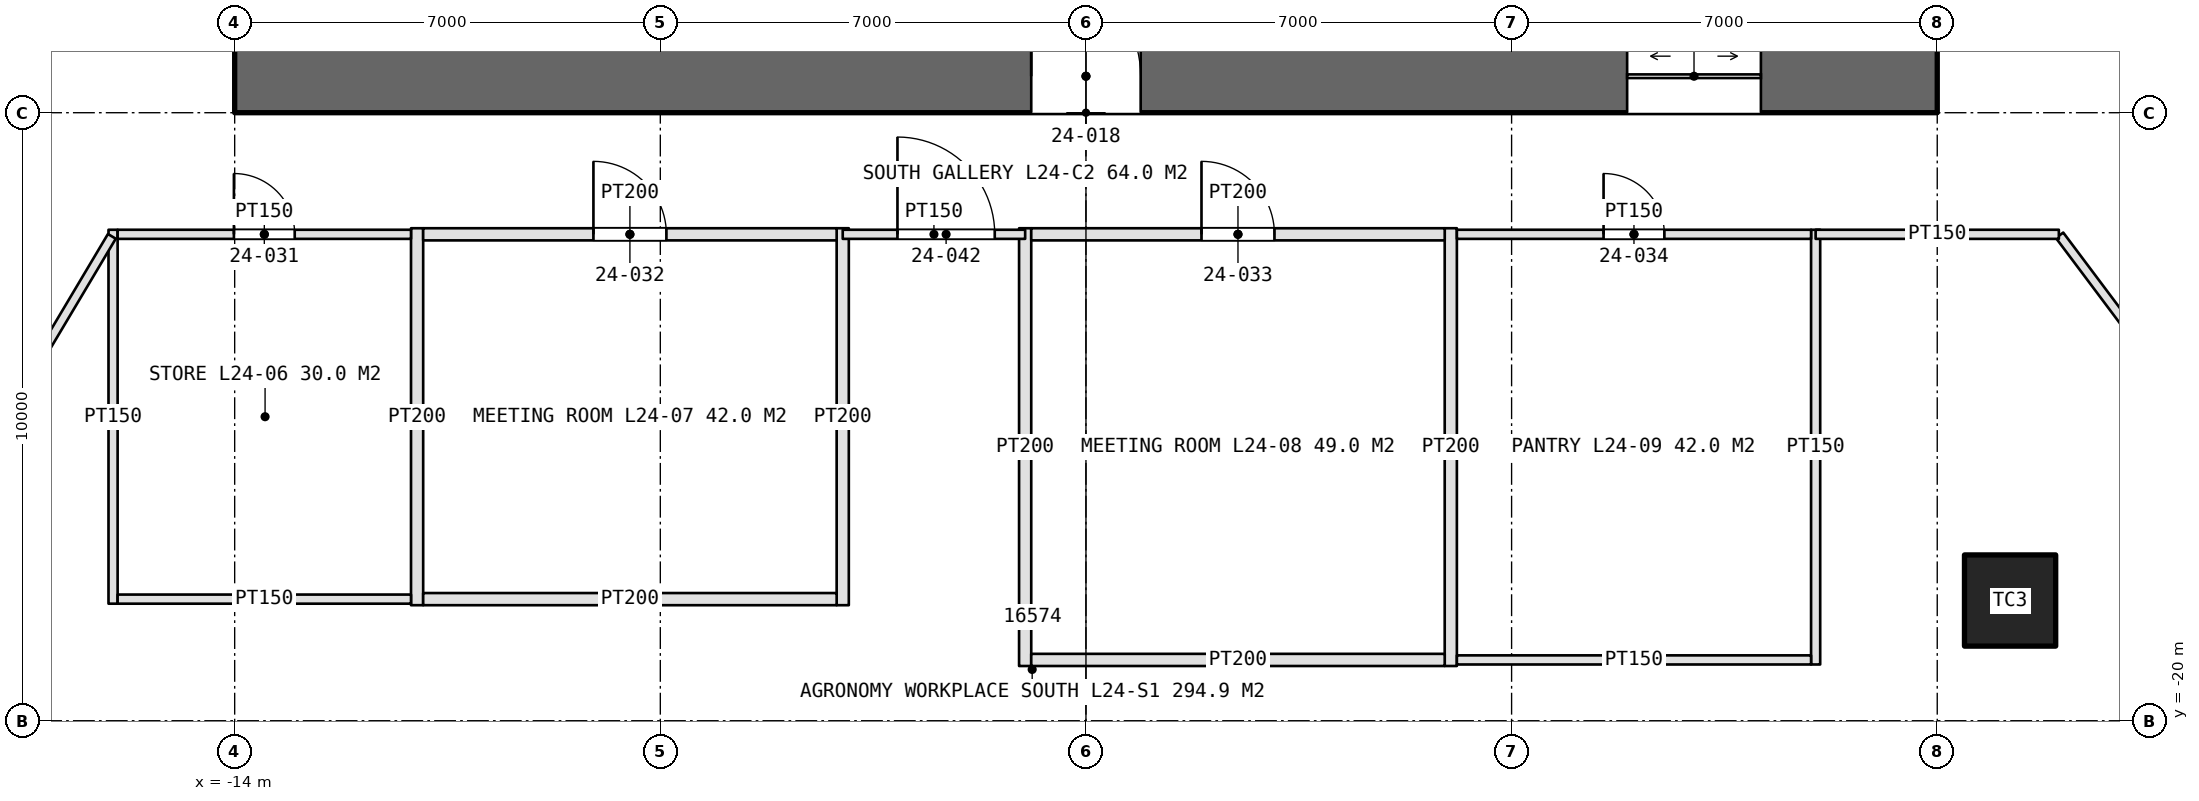
"""IFC4 building model, lengths in metres.
Left out: names, types, materials, properties, quantities, classifications, styles, units other than length and angle.
Written with IfcOpenShell. Run it as: python <this file> out.ifc"""

import sys

from ifc_helpers import new_model, si_unit, direction, frame, frame_2d, origin, origin_2d, place, context, subcontext, project, spatial, rectangle, extrude, element, fill, save


model = new_model("IFC4")
c1 = context("Model", 3, precision=1e-05, world=origin(), true_north=direction((0.0, 1.0)))
c2 = subcontext(c1, "Body", "Model", "MODEL_VIEW")
j1 = project(units=[si_unit("LENGTHUNIT", "METRE"), si_unit("PLANEANGLEUNIT", "RADIAN")], contexts=[c1])
p1 = place(None, origin())
s1 = spatial("IfcSite", under=j1, at=p1, CompositionType="ELEMENT")
p2 = place(p1, origin())
s2 = spatial("IfcBuilding", under=s1, at=p2, CompositionType="ELEMENT")
p3 = place(p2, frame((0.0, 0.0, 117.6)))
s3 = spatial("IfcBuildingStorey", under=s2, at=p3, CompositionType="ELEMENT", Elevation=117.6)
p4 = place(p3, frame((-14.0, -9.4, 0.0), z_axis=(0.0, 0.0, 1.0), x_axis=(1.0, 0.0, 0.0)))
e1 = element("IfcWall", 1, at=p4, inside=s3, PredefinedType="SHEAR", context=c2, shape_type="SweptSolid", body=[
    extrude(rectangle(XDim=28.0, YDim=1.2, at=frame_2d((14.0, 0.0))), origin(), (0.0, 0.0, 1.0), 4.2),
])
p5 = place(p4, frame((13.1, 0.0, 0.0)))
e2 = element("IfcOpeningElement", 2, at=p5, cuts=e1, PredefinedType="OPENING", context=c2, shape_type="SweptSolid", body=[
    extrude(rectangle(XDim=1.8, YDim=2.4, at=frame_2d((0.9, 1.2))), frame((0.0, 0.61, 0.0), z_axis=(0.0, -1.0, 0.0), x_axis=(1.0, 0.0, 0.0)), (0.0, 0.0, 1.0), 1.22),
])
p6 = place(p4, frame((22.9, 0.0, 0.0)))
e3 = element("IfcOpeningElement", 3, at=p6, cuts=e1, PredefinedType="OPENING", context=c2, shape_type="SweptSolid", body=[
    extrude(rectangle(XDim=2.2, YDim=2.7, at=frame_2d((1.1, 1.35))), frame((0.0, 0.61, 0.0), z_axis=(0.0, -1.0, 0.0), x_axis=(1.0, 0.0, 0.0)), (0.0, 0.0, 1.0), 1.22),
])
p7 = place(p3, frame((15.198, -18.023, 0.0), z_axis=(0.0, 0.0, 1.0), x_axis=(1.0, 0.0, 0.0)))
e4 = element("IfcColumn", 4, at=p7, inside=s3, PredefinedType="COLUMN", context=c2, shape_type="SweptSolid", body=[
    extrude(rectangle(XDim=1.5, YDim=1.5, at=origin_2d()), origin(), (0.0, 0.0, 1.0), 4.2),
])
p8 = place(p3, frame((-16.0, -11.925, 0.0), z_axis=(0.0, 0.0, 1.0), x_axis=(0.0, -1.0, 0.0)))
e5 = element("IfcWall", 5, at=p8, inside=s3, PredefinedType="PARTITIONING", context=c2, shape_type="SweptSolid", body=[
    extrude(rectangle(XDim=6.15, YDim=0.15, at=frame_2d((3.075, 0.0))), origin(), (0.0, 0.0, 1.0), 3.0),
])
for number, where, z_axis, x_axis in (
    (6, (-11.0, -11.9, 0.0), (0.0, 0.0, 1.0), (0.0, -1.0, 0.0)),
    (7, (-4.0, -11.9, 0.0), (0.0, 0.0, 1.0), (0.0, -1.0, 0.0)),
):
    element("IfcWall", number, at=place(p3, frame(where, z_axis=z_axis, x_axis=x_axis)), inside=s3, PredefinedType="PARTITIONING", context=c2, shape_type="SweptSolid", body=[
        extrude(rectangle(XDim=6.2, YDim=0.2, at=frame_2d((3.1, 0.0))), origin(), (0.0, 0.0, 1.0), 3.0),
    ])
p9 = place(p3, frame((-15.925, -12.0, 0.0), z_axis=(0.0, 0.0, 1.0), x_axis=(1.0, 0.0, 0.0)))
e8 = element("IfcWall", 8, at=p9, inside=s3, PredefinedType="PARTITIONING", context=c2, shape_type="SweptSolid", body=[
    extrude(rectangle(XDim=4.825, YDim=0.15, at=frame_2d((2.413, 0.0))), origin(), (0.0, 0.0, 1.0), 3.0),
])
p10 = place(p9, frame((1.913, 0.0, 0.0)))
e9 = element("IfcOpeningElement", 9, at=p10, cuts=e8, PredefinedType="OPENING", context=c2, shape_type="SweptSolid", body=[
    extrude(rectangle(XDim=1.0, YDim=2.2, at=frame_2d((0.5, 1.1))), frame((0.0, 0.085, 0.0), z_axis=(0.0, -1.0, 0.0), x_axis=(1.0, 0.0, 0.0)), (0.0, 0.0, 1.0), 0.17),
])
p11 = place(p3, frame((-15.925, -18.0, 0.0), z_axis=(0.0, 0.0, 1.0), x_axis=(1.0, 0.0, 0.0)))
e10 = element("IfcWall", 10, at=p11, inside=s3, PredefinedType="PARTITIONING", context=c2, shape_type="SweptSolid", body=[
    extrude(rectangle(XDim=4.825, YDim=0.15, at=frame_2d((2.413, 0.0))), origin(), (0.0, 0.0, 1.0), 3.0),
])
p12 = place(p3, frame((-10.9, -12.0, 0.0), z_axis=(0.0, 0.0, 1.0), x_axis=(1.0, 0.0, 0.0)))
e11 = element("IfcWall", 11, at=p12, inside=s3, PredefinedType="PARTITIONING", context=c2, shape_type="SweptSolid", body=[
    extrude(rectangle(XDim=6.8, YDim=0.2, at=frame_2d((3.4, 0.0))), origin(), (0.0, 0.0, 1.0), 3.0),
])
p13 = place(p12, frame((2.8, 0.0, 0.0)))
e12 = element("IfcOpeningElement", 12, at=p13, cuts=e11, PredefinedType="OPENING", context=c2, shape_type="SweptSolid", body=[
    extrude(rectangle(XDim=1.2, YDim=2.4, at=frame_2d((0.6, 1.2))), frame((0.0, 0.11, 0.0), z_axis=(0.0, -1.0, 0.0), x_axis=(1.0, 0.0, 0.0)), (0.0, 0.0, 1.0), 0.22),
])
p14 = place(p3, frame((-10.9, -18.0, 0.0), z_axis=(0.0, 0.0, 1.0), x_axis=(1.0, 0.0, 0.0)))
e13 = element("IfcWall", 13, at=p14, inside=s3, PredefinedType="PARTITIONING", context=c2, shape_type="SweptSolid", body=[
    extrude(rectangle(XDim=6.8, YDim=0.2, at=frame_2d((3.4, 0.0))), origin(), (0.0, 0.0, 1.0), 3.0),
])
for number, where, z_axis, x_axis in (
    (14, (-1.0, -11.9, 0.0), (0.0, 0.0, 1.0), (0.0, -1.0, 0.0)),
    (15, (6.0, -11.9, 0.0), (0.0, 0.0, 1.0), (0.0, -1.0, 0.0)),
):
    element("IfcWall", number, at=place(p3, frame(where, z_axis=z_axis, x_axis=x_axis)), inside=s3, PredefinedType="PARTITIONING", context=c2, shape_type="SweptSolid", body=[
        extrude(rectangle(XDim=7.2, YDim=0.2, at=frame_2d((3.6, 0.0))), origin(), (0.0, 0.0, 1.0), 3.0),
    ])
p15 = place(p3, frame((12.0, -11.925, 0.0), z_axis=(0.0, 0.0, 1.0), x_axis=(0.0, -1.0, 0.0)))
e16 = element("IfcWall", 16, at=p15, inside=s3, PredefinedType="PARTITIONING", context=c2, shape_type="SweptSolid", body=[
    extrude(rectangle(XDim=7.15, YDim=0.15, at=frame_2d((3.575, 0.0))), origin(), (0.0, 0.0, 1.0), 3.0),
])
p16 = place(p3, frame((-0.9, -12.0, 0.0), z_axis=(0.0, 0.0, 1.0), x_axis=(1.0, 0.0, 0.0)))
e17 = element("IfcWall", 17, at=p16, inside=s3, PredefinedType="PARTITIONING", context=c2, shape_type="SweptSolid", body=[
    extrude(rectangle(XDim=6.8, YDim=0.2, at=frame_2d((3.4, 0.0))), origin(), (0.0, 0.0, 1.0), 3.0),
])
p17 = place(p16, frame((2.8, 0.0, 0.0)))
e18 = element("IfcOpeningElement", 18, at=p17, cuts=e17, PredefinedType="OPENING", context=c2, shape_type="SweptSolid", body=[
    extrude(rectangle(XDim=1.2, YDim=2.4, at=frame_2d((0.6, 1.2))), frame((0.0, 0.11, 0.0), z_axis=(0.0, -1.0, 0.0), x_axis=(1.0, 0.0, 0.0)), (0.0, 0.0, 1.0), 0.22),
])
p18 = place(p3, frame((-0.9, -19.0, 0.0), z_axis=(0.0, 0.0, 1.0), x_axis=(1.0, 0.0, 0.0)))
e19 = element("IfcWall", 19, at=p18, inside=s3, PredefinedType="PARTITIONING", context=c2, shape_type="SweptSolid", body=[
    extrude(rectangle(XDim=6.8, YDim=0.2, at=frame_2d((3.4, 0.0))), origin(), (0.0, 0.0, 1.0), 3.0),
])
p19 = place(p3, frame((6.1, -12.0, 0.0), z_axis=(0.0, 0.0, 1.0), x_axis=(1.0, 0.0, 0.0)))
e20 = element("IfcWall", 20, at=p19, inside=s3, PredefinedType="PARTITIONING", context=c2, shape_type="SweptSolid", body=[
    extrude(rectangle(XDim=5.825, YDim=0.15, at=frame_2d((2.913, 0.0))), origin(), (0.0, 0.0, 1.0), 3.0),
])
p20 = place(p19, frame((2.413, 0.0, 0.0)))
e21 = element("IfcOpeningElement", 21, at=p20, cuts=e20, PredefinedType="OPENING", context=c2, shape_type="SweptSolid", body=[
    extrude(rectangle(XDim=1.0, YDim=2.2, at=frame_2d((0.5, 1.1))), frame((0.0, 0.085, 0.0), z_axis=(0.0, -1.0, 0.0), x_axis=(1.0, 0.0, 0.0)), (0.0, 0.0, 1.0), 0.17),
])
p21 = place(p3, frame((6.1, -19.0, 0.0), z_axis=(0.0, 0.0, 1.0), x_axis=(1.0, 0.0, 0.0)))
e22 = element("IfcWall", 22, at=p21, inside=s3, PredefinedType="PARTITIONING", context=c2, shape_type="SweptSolid", body=[
    extrude(rectangle(XDim=5.825, YDim=0.15, at=frame_2d((2.913, 0.0))), origin(), (0.0, 0.0, 1.0), 3.0),
])
p22 = place(p3, frame((-16.02, -12.034, 0.0), z_axis=(0.0, 0.0, 1.0), x_axis=(-0.511518902153, -0.859272024879, 0.0)))
e23 = element("IfcWall", 23, at=p22, inside=s3, PredefinedType="PARTITIONING", context=c2, shape_type="SweptSolid", body=[
    extrude(rectangle(XDim=8.451, YDim=0.15, at=frame_2d((4.226, 0.0))), origin(), (0.0, 0.0, 1.0), 3.0),
])
p23 = place(p3, frame((16.012, -12.016, 0.0), z_axis=(0.0, 0.0, 1.0), x_axis=(0.600059749679, -0.799955184254, 0.0)))
e24 = element("IfcWall", 24, at=p23, inside=s3, PredefinedType="PARTITIONING", context=c2, shape_type="SweptSolid", body=[
    extrude(rectangle(XDim=7.191, YDim=0.15, at=frame_2d((3.596, 0.0))), origin(), (0.0, 0.0, 1.0), 3.0),
])
p24 = place(p3, frame((-4.0, -12.0, 0.0), z_axis=(0.0, 0.0, 1.0), x_axis=(1.0, 0.0, 0.0)))
e25 = element("IfcWall", 25, at=p24, inside=s3, PredefinedType="PARTITIONING", context=c2, shape_type="SweptSolid", body=[
    extrude(rectangle(XDim=3.0, YDim=0.15, at=frame_2d((1.5, 0.0))), origin(), (0.0, 0.0, 1.0), 3.0),
])
p25 = place(p24, frame((0.9, 0.0, 0.0)))
e26 = element("IfcOpeningElement", 26, at=p25, cuts=e25, PredefinedType="OPENING", context=c2, shape_type="SweptSolid", body=[
    extrude(rectangle(XDim=1.6, YDim=2.4, at=frame_2d((0.8, 1.2))), frame((0.0, 0.085, 0.0), z_axis=(0.0, -1.0, 0.0), x_axis=(1.0, 0.0, 0.0)), (0.0, 0.0, 1.0), 0.17),
])
p26 = place(p3, frame((12.0, -12.0, 0.0), z_axis=(0.0, 0.0, 1.0), x_axis=(1.0, 0.0, 0.0)))
e27 = element("IfcWall", 27, at=p26, inside=s3, PredefinedType="PARTITIONING", context=c2, shape_type="SweptSolid", body=[
    extrude(rectangle(XDim=4.0, YDim=0.15, at=frame_2d((2.0, 0.0))), origin(), (0.0, 0.0, 1.0), 3.0),
])
p27 = place(p5, origin())
e28 = element("IfcDoor", 28, at=p27, inside=s3, OperationType="DOUBLE_DOOR_SINGLE_SWING", PredefinedType="DOOR", context=c2, shape_type="SweptSolid", body=[
    extrude(rectangle(XDim=1.8, YDim=2.4, at=frame_2d((0.9, 1.2))), frame((0.0, 0.025, 0.0), z_axis=(0.0, -1.0, 0.0), x_axis=(1.0, 0.0, 0.0)), (0.0, 0.0, 1.0), 0.05),
])
fill(e2, e28)
p28 = place(p6, origin())
e29 = element("IfcDoor", 29, at=p28, inside=s3, OperationType="DOUBLE_DOOR_SLIDING", PredefinedType="DOOR", context=c2, shape_type="SweptSolid", body=[
    extrude(rectangle(XDim=2.2, YDim=2.7, at=frame_2d((1.1, 1.35))), frame((0.0, 0.025, 0.0), z_axis=(0.0, -1.0, 0.0), x_axis=(1.0, 0.0, 0.0)), (0.0, 0.0, 1.0), 0.05),
])
fill(e3, e29)
p29 = place(p10, origin())
e30 = element("IfcDoor", 30, at=p29, inside=s3, OperationType="SINGLE_SWING_LEFT", PredefinedType="DOOR", context=c2, shape_type="SweptSolid", body=[
    extrude(rectangle(XDim=1.0, YDim=2.2, at=frame_2d((0.5, 1.1))), frame((0.0, 0.025, 0.0), z_axis=(0.0, -1.0, 0.0), x_axis=(1.0, 0.0, 0.0)), (0.0, 0.0, 1.0), 0.05),
])
fill(e9, e30)
p30 = place(p13, origin())
e31 = element("IfcDoor", 31, at=p30, inside=s3, OperationType="SINGLE_SWING_LEFT", PredefinedType="DOOR", context=c2, shape_type="SweptSolid", body=[
    extrude(rectangle(XDim=1.2, YDim=2.4, at=frame_2d((0.6, 1.2))), frame((0.0, 0.025, 0.0), z_axis=(0.0, -1.0, 0.0), x_axis=(1.0, 0.0, 0.0)), (0.0, 0.0, 1.0), 0.05),
])
fill(e12, e31)
p31 = place(p17, origin())
e32 = element("IfcDoor", 32, at=p31, inside=s3, OperationType="SINGLE_SWING_LEFT", PredefinedType="DOOR", context=c2, shape_type="SweptSolid", body=[
    extrude(rectangle(XDim=1.2, YDim=2.4, at=frame_2d((0.6, 1.2))), frame((0.0, 0.025, 0.0), z_axis=(0.0, -1.0, 0.0), x_axis=(1.0, 0.0, 0.0)), (0.0, 0.0, 1.0), 0.05),
])
fill(e18, e32)
p32 = place(p20, origin())
e33 = element("IfcDoor", 33, at=p32, inside=s3, OperationType="SINGLE_SWING_LEFT", PredefinedType="DOOR", context=c2, shape_type="SweptSolid", body=[
    extrude(rectangle(XDim=1.0, YDim=2.2, at=frame_2d((0.5, 1.1))), frame((0.0, 0.025, 0.0), z_axis=(0.0, -1.0, 0.0), x_axis=(1.0, 0.0, 0.0)), (0.0, 0.0, 1.0), 0.05),
])
fill(e21, e33)
p33 = place(p25, origin())
e34 = element("IfcDoor", 34, at=p33, inside=s3, OperationType="DOUBLE_DOOR_SINGLE_SWING", PredefinedType="DOOR", context=c2, shape_type="SweptSolid", body=[
    extrude(rectangle(XDim=1.6, YDim=2.4, at=frame_2d((0.8, 1.2))), frame((0.0, 0.025, 0.0), z_axis=(0.0, -1.0, 0.0), x_axis=(1.0, 0.0, 0.0)), (0.0, 0.0, 1.0), 0.05),
])
fill(e26, e34)
save(model, sys.argv[1])
